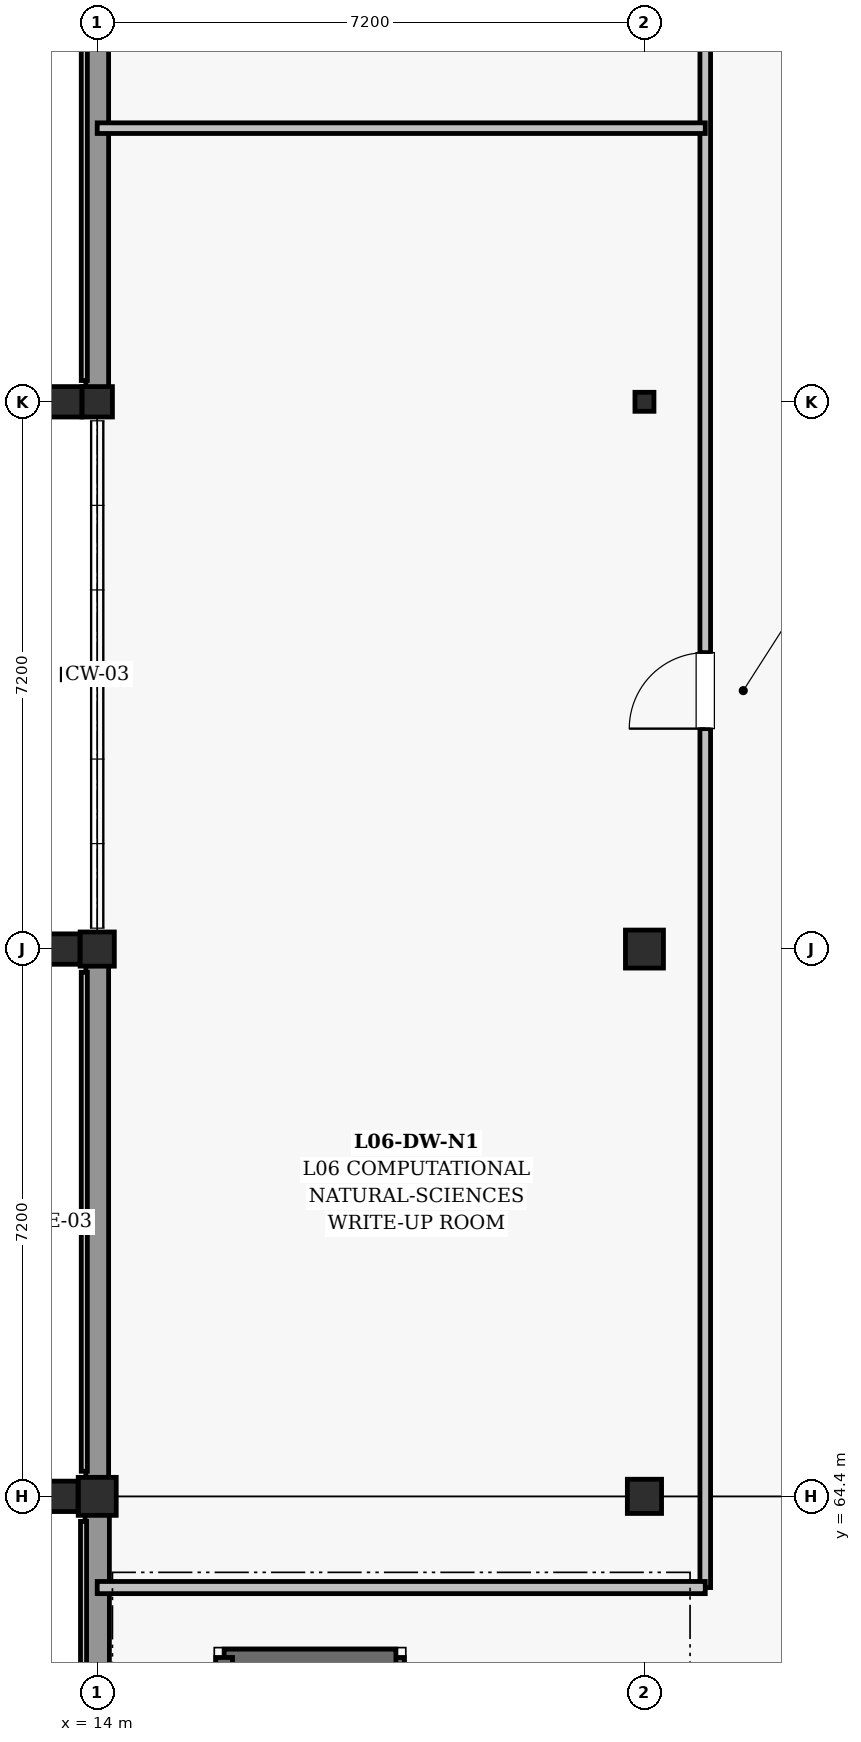
"""IFC4 building model, lengths in metres.
Left out: names, types, materials, properties, quantities, classifications, styles, units other than length and angle.
Written with IfcOpenShell. Run it as: python <this file> out.ifc"""

import sys

from ifc_helpers import new_model, si_unit, direction, frame, frame_2d, origin, origin_2d, place, context, subcontext, project, spatial, rectangle, i_section, extrude, element, fill, save


model = new_model("IFC4")
c1 = context("Model", 3, precision=1e-05, world=origin(), true_north=direction((0.0, 1.0)))
c2 = subcontext(c1, "Body", "Model", "MODEL_VIEW")
j1 = project(units=[si_unit("LENGTHUNIT", "METRE"), si_unit("PLANEANGLEUNIT", "RADIAN")], contexts=[c1])
p1 = place(None, origin())
s1 = spatial("IfcSite", under=j1, at=p1, CompositionType="ELEMENT")
p2 = place(p1, origin())
s2 = spatial("IfcBuilding", under=s1, at=p2, CompositionType="ELEMENT")
p3 = place(p2, frame((0.0, 0.0, 27.9)))
s3 = spatial("IfcBuildingStorey", under=s2, at=p3, CompositionType="ELEMENT", Elevation=27.9)
p4 = place(p3, frame((14.0, 64.4, 0.0), z_axis=(0.0, 0.0, 1.0), x_axis=(1.0, 0.0, 0.0)))
e1 = element("IfcColumn", 1, at=p4, inside=s3, PredefinedType="COLUMN", context=c2, shape_type="SweptSolid", body=[
    extrude(rectangle(XDim=0.5, YDim=0.5, at=origin_2d()), origin(), (0.0, 0.0, 1.0), 4.5),
])
p5 = place(p3, frame((14.0, 71.6, 0.0), z_axis=(0.0, 0.0, 1.0), x_axis=(1.0, 0.0, 0.0)))
e2 = element("IfcColumn", 2, at=p5, inside=s3, PredefinedType="COLUMN", context=c2, shape_type="SweptSolid", body=[
    extrude(rectangle(XDim=0.45, YDim=0.45, at=origin_2d()), origin(), (0.0, 0.0, 1.0), 4.5),
])
p6 = place(p3, frame((14.0, 78.8, 0.0), z_axis=(0.0, 0.0, 1.0), x_axis=(1.0, 0.0, 0.0)))
e3 = element("IfcColumn", 3, at=p6, inside=s3, PredefinedType="COLUMN", context=c2, shape_type="SweptSolid", body=[
    extrude(rectangle(XDim=0.4, YDim=0.4, at=origin_2d()), origin(), (0.0, 0.0, 1.0), 4.5),
])
p7 = place(p3, frame((21.2, 64.4, 0.0), z_axis=(0.0, 0.0, 1.0), x_axis=(1.0, 0.0, 0.0)))
e4 = element("IfcColumn", 4, at=p7, inside=s3, PredefinedType="COLUMN", context=c2, shape_type="SweptSolid", body=[
    extrude(rectangle(XDim=0.45, YDim=0.45, at=origin_2d()), origin(), (0.0, 0.0, 1.0), 4.5),
])
p8 = place(p3, frame((21.2, 71.6, 0.0), z_axis=(0.0, 0.0, 1.0), x_axis=(1.0, 0.0, 0.0)))
e5 = element("IfcColumn", 5, at=p8, inside=s3, PredefinedType="COLUMN", context=c2, shape_type="SweptSolid", body=[
    extrude(rectangle(XDim=0.5, YDim=0.5, at=origin_2d()), origin(), (0.0, 0.0, 1.0), 4.5),
])
p9 = place(p3, frame((21.2, 78.8, 0.0), z_axis=(0.0, 0.0, 1.0), x_axis=(1.0, 0.0, 0.0)))
e6 = element("IfcColumn", 6, at=p9, inside=s3, PredefinedType="COLUMN", context=c2, shape_type="SweptSolid", body=[
    extrude(i_section(OverallWidth=0.25, OverallDepth=0.25, WebThickness=0.009, FlangeThickness=0.01, FilletRadius=0.01, at=origin_2d()), origin(), (0.0, 0.0, 1.0), 4.5),
])
for number, where, z_axis, x_axis in (
    (7, (13.447, 64.4, 0.0), (0.0, 0.0, 1.0), (0.0, 1.0, 0.0)),
    (8, (13.472, 71.6, 0.0), (0.0, 0.0, 1.0), (0.0, 1.0, 0.0)),
    (9, (13.497, 78.8, 0.0), (0.0, 0.0, 1.0), (0.0, 1.0, 0.0)),
):
    element("IfcColumn", number, at=place(p3, frame(where, z_axis=z_axis, x_axis=x_axis)), inside=s3, PredefinedType="PILASTER", context=c2, shape_type="SweptSolid", body=[
        extrude(rectangle(XDim=0.4, YDim=0.6, at=origin_2d()), origin(), (0.0, 0.0, 1.0), 4.5),
    ])
p10 = place(p3, frame((14.0, 57.38, 0.0), z_axis=(0.0, 0.0, 1.0), x_axis=(0.0, 1.0, 0.0)))
e10 = element("IfcWall", 10, at=p10, inside=s3, PredefinedType="SOLIDWALL", context=c2, shape_type="SweptSolid", body=[
    extrude(rectangle(XDim=6.79, YDim=0.32, at=frame_2d((3.395, 0.0))), origin(), (0.0, 0.0, 1.0), 3.435),
])
p11 = place(p3, frame((14.0, 64.63, 0.0), z_axis=(0.0, 0.0, 1.0), x_axis=(0.0, 1.0, 0.0)))
e11 = element("IfcWall", 11, at=p11, inside=s3, PredefinedType="SOLIDWALL", context=c2, shape_type="SweptSolid", body=[
    extrude(rectangle(XDim=6.765, YDim=0.3, at=frame_2d((3.383, 0.0))), origin(), (0.0, 0.0, 1.0), 3.405),
])
p12 = place(p3, frame((14.0, 78.98, 0.0), z_axis=(0.0, 0.0, 1.0), x_axis=(0.0, 1.0, 0.0)))
e12 = element("IfcWall", 12, at=p12, inside=s3, PredefinedType="SOLIDWALL", context=c2, shape_type="SweptSolid", body=[
    extrude(rectangle(XDim=6.815, YDim=0.3, at=frame_2d((3.407, 0.0))), origin(), (0.0, 0.0, 1.0), 3.355),
])
p13 = place(p3, frame((17.93, 59.72, 0.0), z_axis=(0.0, 0.0, 1.0), x_axis=(0.0, 1.0, 0.0)))
e13 = element("IfcWall", 13, at=p13, inside=s3, PredefinedType="SHEAR", context=c2, shape_type="SweptSolid", body=[
    extrude(rectangle(XDim=2.56, YDim=0.22, at=frame_2d((1.28, 0.0))), origin(), (0.0, 0.0, 1.0), 4.195),
])
p14 = place(p13, frame((0.73, 0.0, 0.0)))
e14 = element("IfcOpeningElement", 14, at=p14, cuts=e13, PredefinedType="OPENING", context=c2, shape_type="SweptSolid", body=[
    extrude(rectangle(XDim=1.1, YDim=2.15, at=frame_2d((0.55, 1.075))), frame((0.0, 0.12, 0.0), z_axis=(0.0, -1.0, 0.0), x_axis=(1.0, 0.0, 0.0)), (0.0, 0.0, 1.0), 0.24),
])
p15 = place(p3, frame((17.93, 62.28, 0.0), z_axis=(0.0, 0.0, 1.0), x_axis=(-1.0, 0.0, 0.0)))
e15 = element("IfcWall", 15, at=p15, inside=s3, PredefinedType="SHEAR", context=c2, shape_type="SweptSolid", body=[
    extrude(rectangle(XDim=2.26, YDim=0.22, at=frame_2d((1.13, 0.0))), origin(), (0.0, 0.0, 1.0), 4.195),
])
p16 = place(p3, frame((15.67, 62.28, 0.0), z_axis=(0.0, 0.0, 1.0), x_axis=(0.0, -1.0, 0.0)))
e16 = element("IfcWall", 16, at=p16, inside=s3, PredefinedType="SHEAR", context=c2, shape_type="SweptSolid", body=[
    extrude(rectangle(XDim=2.56, YDim=0.22, at=frame_2d((1.28, 0.0))), origin(), (0.0, 0.0, 1.0), 4.195),
])
p17 = place(p3, frame((22.0, 63.2, 0.0), z_axis=(0.0, 0.0, 1.0), x_axis=(0.0, 1.0, 0.0)))
e17 = element("IfcWall", 17, at=p17, inside=s3, PredefinedType="PARTITIONING", context=c2, shape_type="SweptSolid", body=[
    extrude(rectangle(XDim=39.6, YDim=0.14, at=frame_2d((19.8, 0.0))), origin(), (0.0, 0.0, 1.0), 3.36),
])
p18 = place(p17, frame((11.3, 0.0, 0.0)))
e18 = element("IfcOpeningElement", 18, at=p18, cuts=e17, PredefinedType="OPENING", context=c2, shape_type="SweptSolid", body=[
    extrude(rectangle(XDim=1.0, YDim=2.15, at=frame_2d((0.5, 1.075))), frame((0.0, 0.08, 0.0), z_axis=(0.0, -1.0, 0.0), x_axis=(1.0, 0.0, 0.0)), (0.0, 0.0, 1.0), 0.16),
])
p19 = place(p17, frame((26.3, 0.0, 0.0)))
e19 = element("IfcOpeningElement", 19, at=p19, cuts=e17, PredefinedType="OPENING", context=c2, shape_type="SweptSolid", body=[
    extrude(rectangle(XDim=1.1, YDim=2.15, at=frame_2d((0.55, 1.075))), frame((0.0, 0.08, 0.0), z_axis=(0.0, -1.0, 0.0), x_axis=(1.0, 0.0, 0.0)), (0.0, 0.0, 1.0), 0.16),
])
p20 = place(p3, frame((14.0, 63.2, 0.0), z_axis=(0.0, 0.0, 1.0), x_axis=(1.0, 0.0, 0.0)))
e20 = element("IfcWall", 20, at=p20, inside=s3, PredefinedType="PARTITIONING", context=c2, shape_type="SweptSolid", body=[
    extrude(rectangle(XDim=8.0, YDim=0.16, at=frame_2d((4.0, 0.0))), origin(), (0.0, 0.0, 1.0), 3.56),
])
p21 = place(p3, frame((14.0, 82.4, 0.0), z_axis=(0.0, 0.0, 1.0), x_axis=(1.0, 0.0, 0.0)))
e21 = element("IfcWall", 21, at=p21, inside=s3, PredefinedType="PARTITIONING", context=c2, shape_type="SweptSolid", body=[
    extrude(rectangle(XDim=8.0, YDim=0.14, at=frame_2d((4.0, 0.0))), origin(), (0.0, 0.0, 1.0), 3.56),
])
p22 = place(p18, origin())
e22 = element("IfcDoor", 22, at=p22, inside=s3, OperationType="SINGLE_SWING_LEFT", PredefinedType="DOOR", context=c2, shape_type="SweptSolid", body=[
    extrude(rectangle(XDim=1.0, YDim=2.15, at=frame_2d((0.5, 1.075))), frame((0.0, 0.025, 0.0), z_axis=(0.0, -1.0, 0.0), x_axis=(1.0, 0.0, 0.0)), (0.0, 0.0, 1.0), 0.05),
])
fill(e18, e22)
save(model, sys.argv[1])
